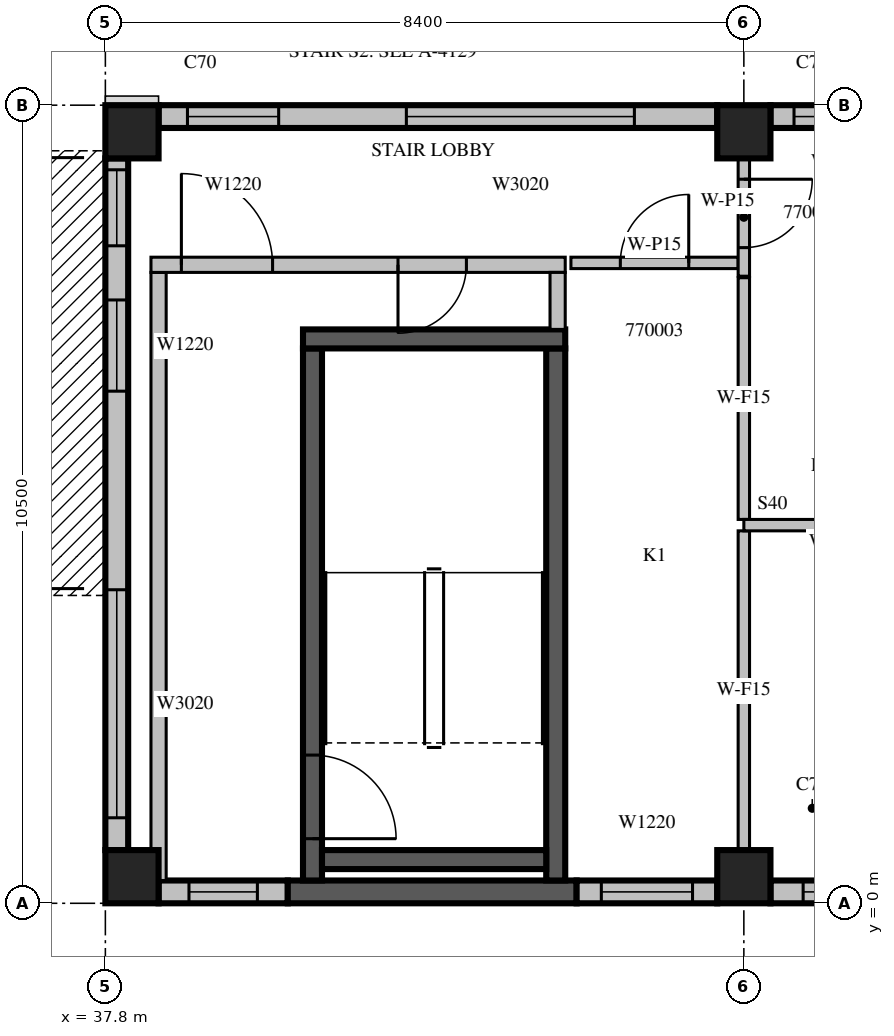
"""IFC4 building model, lengths in metres.
Left out: names, types, materials, properties, quantities, classifications, styles, units other than length and angle.
Written with IfcOpenShell. Run it as: python <this file> out.ifc"""

import sys

from ifc_helpers import new_model, si_unit, direction, frame, frame_2d, origin, origin_2d, place, context, subcontext, project, spatial, rectangle, extrude, source, transform, mapped, element, fill, save


model = new_model("IFC4")
c1 = context("Model", 3, precision=1e-05, world=origin(), true_north=direction((0.0, 1.0)))
c2 = subcontext(c1, "Body", "Model", "MODEL_VIEW")
j1 = project(units=[si_unit("LENGTHUNIT", "METRE"), si_unit("PLANEANGLEUNIT", "RADIAN")], contexts=[c1])
p1 = place(None, origin())
s1 = spatial("IfcSite", under=j1, at=p1, CompositionType="ELEMENT")
p2 = place(p1, origin())
s2 = spatial("IfcBuilding", under=s1, at=p2, CompositionType="ELEMENT")
p3 = place(p2, frame((0.0, 0.0, 305.5)))
s3 = spatial("IfcBuildingStorey", under=s2, at=p3, CompositionType="ELEMENT", Elevation=305.5)
m1 = source(origin(), c2, "Body", "SweptSolid", [
    extrude(rectangle(XDim=0.7, YDim=0.7, at=origin_2d()), origin(), (0.0, 0.0, 1.0), 3.5),
])
for number, where, z_axis, x_axis in (
    (1, (38.15, 0.35, 0.0), (0.0, 0.0, 1.0), (1.0, 0.0, 0.0)),
    (2, (46.2, 0.35, 0.0), (0.0, 0.0, 1.0), (1.0, 0.0, 0.0)),
    (3, (38.15, 10.15, 0.0), (0.0, 0.0, 1.0), (1.0, 0.0, 0.0)),
    (4, (46.2, 10.15, 0.0), (0.0, 0.0, 1.0), (1.0, 0.0, 0.0)),
):
    element("IfcColumn", number, at=place(p3, frame(where, z_axis=z_axis, x_axis=x_axis)), inside=s3, PredefinedType="COLUMN", context=c2, shape_type="MappedRepresentation", body=[
        mapped(m1, transform((0.0, 0.0, 0.0), scale=1.0)),
    ])
m2 = source(origin(), c2, "Body", "SweptSolid", [
    extrude(rectangle(XDim=1.7, YDim=0.3, at=frame_2d((0.85, 0.0))), origin(), (0.0, 0.0, 1.0), 3.1),
])
p4 = place(p3, frame((38.5, 0.15, 0.0), z_axis=(0.0, 0.0, 1.0), x_axis=(1.0, 0.0, 0.0)))
e5 = element("IfcWall", 5, at=p4, inside=s3, PredefinedType="STANDARD", context=c2, shape_type="MappedRepresentation", body=[
    mapped(m2, transform((0.0, 0.0, 0.0), scale=1.0)),
])
m3 = source(origin(), c2, "Body", "SweptSolid", [
    extrude(rectangle(XDim=0.9, YDim=2.0, at=frame_2d((0.45, 1.0))), frame((0.0, 0.16, 0.0), z_axis=(0.0, -1.0, 0.0), x_axis=(1.0, 0.0, 0.0)), (0.0, 0.0, 1.0), 0.32),
])
p5 = place(p4, frame((0.4, 0.0, 0.6)))
e6 = element("IfcOpeningElement", 6, at=p5, cuts=e5, PredefinedType="OPENING", context=c2, shape_type="MappedRepresentation", body=[
    mapped(m3, transform((0.0, 0.0, 0.0), scale=1.0)),
])
m4 = source(origin(), c2, "Body", "SweptSolid", [
    extrude(rectangle(XDim=3.8, YDim=0.3, at=frame_2d((1.9, 0.0))), origin(), (0.0, 0.0, 1.0), 3.1),
])
p6 = place(p3, frame((40.2, 0.15, 0.0), z_axis=(0.0, 0.0, 1.0), x_axis=(1.0, 0.0, 0.0)))
e7 = element("IfcWall", 7, at=p6, inside=s3, PredefinedType="SOLIDWALL", context=c2, shape_type="MappedRepresentation", body=[
    mapped(m4, transform((0.0, 0.0, 0.0), scale=1.0)),
])
m5 = source(origin(), c2, "Body", "SweptSolid", [
    extrude(rectangle(XDim=1.85, YDim=0.3, at=frame_2d((0.925, 0.0))), origin(), (0.0, 0.0, 1.0), 3.1),
])
p7 = place(p3, frame((44.0, 0.15, 0.0), z_axis=(0.0, 0.0, 1.0), x_axis=(1.0, 0.0, 0.0)))
e8 = element("IfcWall", 8, at=p7, inside=s3, PredefinedType="STANDARD", context=c2, shape_type="MappedRepresentation", body=[
    mapped(m5, transform((0.0, 0.0, 0.0), scale=1.0)),
])
m6 = source(origin(), c2, "Body", "SweptSolid", [
    extrude(rectangle(XDim=1.2, YDim=2.0, at=frame_2d((0.6, 1.0))), frame((0.0, 0.16, 0.0), z_axis=(0.0, -1.0, 0.0), x_axis=(1.0, 0.0, 0.0)), (0.0, 0.0, 1.0), 0.32),
])
p8 = place(p7, frame((0.325, 0.0, 0.6)))
e9 = element("IfcOpeningElement", 9, at=p8, cuts=e8, PredefinedType="OPENING", context=c2, shape_type="MappedRepresentation", body=[
    mapped(m6, transform((0.0, 0.0, 0.0), scale=1.0)),
])
m7 = source(origin(), c2, "Body", "SweptSolid", [
    extrude(rectangle(XDim=3.01, YDim=0.3, at=frame_2d((1.505, 0.0))), origin(), (0.0, 0.0, 1.0), 3.1),
])
p9 = place(p3, frame((46.55, 0.15, 0.0), z_axis=(0.0, 0.0, 1.0), x_axis=(1.0, 0.0, 0.0)))
e10 = element("IfcWall", 10, at=p9, inside=s3, PredefinedType="STANDARD", context=c2, shape_type="MappedRepresentation", body=[
    mapped(m7, transform((0.0, 0.0, 0.0), scale=1.0)),
])
m8 = source(origin(), c2, "Body", "SweptSolid", [
    extrude(rectangle(XDim=1.8, YDim=2.0, at=frame_2d((0.9, 1.0))), frame((0.0, 0.16, 0.0), z_axis=(0.0, -1.0, 0.0), x_axis=(1.0, 0.0, 0.0)), (0.0, 0.0, 1.0), 0.32),
])
p10 = place(p9, frame((0.43, 0.0, 0.6)))
e11 = element("IfcOpeningElement", 11, at=p10, cuts=e10, PredefinedType="OPENING", context=c2, shape_type="MappedRepresentation", body=[
    mapped(m8, transform((0.0, 0.0, 0.0), scale=1.0)),
])
p11 = place(p3, frame((49.56, 10.35, 0.0), z_axis=(0.0, 0.0, 1.0), x_axis=(-1.0, 0.0, 0.0)))
e12 = element("IfcWall", 12, at=p11, inside=s3, PredefinedType="STANDARD", context=c2, shape_type="MappedRepresentation", body=[
    mapped(m7, transform((0.0, 0.0, 0.0), scale=1.0)),
])
p12 = place(p11, frame((1.5, 0.0, 0.6)))
e13 = element("IfcOpeningElement", 13, at=p12, cuts=e12, PredefinedType="OPENING", context=c2, shape_type="MappedRepresentation", body=[
    mapped(m6, transform((0.0, 0.0, 0.0), scale=1.0)),
])
m9 = source(origin(), c2, "Body", "SweptSolid", [
    extrude(rectangle(XDim=7.35, YDim=0.3, at=frame_2d((3.675, 0.0))), origin(), (0.0, 0.0, 1.0), 3.1),
])
p13 = place(p3, frame((45.85, 10.35, 0.0), z_axis=(0.0, 0.0, 1.0), x_axis=(-1.0, 0.0, 0.0)))
e14 = element("IfcWall", 14, at=p13, inside=s3, PredefinedType="STANDARD", context=c2, shape_type="MappedRepresentation", body=[
    mapped(m9, transform((0.0, 0.0, 0.0), scale=1.0)),
])
m10 = source(origin(), c2, "Body", "SweptSolid", [
    extrude(rectangle(XDim=3.0, YDim=2.0, at=frame_2d((1.5, 1.0))), frame((0.0, 0.16, 0.0), z_axis=(0.0, -1.0, 0.0), x_axis=(1.0, 0.0, 0.0)), (0.0, 0.0, 1.0), 0.32),
])
p14 = place(p13, frame((1.09, 0.0, 0.6)))
e15 = element("IfcOpeningElement", 15, at=p14, cuts=e14, PredefinedType="OPENING", context=c2, shape_type="MappedRepresentation", body=[
    mapped(m10, transform((0.0, 0.0, 0.0), scale=1.0)),
])
p15 = place(p13, frame((5.77, 0.0, 0.6)))
e16 = element("IfcOpeningElement", 16, at=p15, cuts=e14, PredefinedType="OPENING", context=c2, shape_type="MappedRepresentation", body=[
    mapped(m6, transform((0.0, 0.0, 0.0), scale=1.0)),
])
m11 = source(origin(), c2, "Body", "SweptSolid", [
    extrude(rectangle(XDim=9.1, YDim=0.3, at=frame_2d((4.55, 0.0))), origin(), (0.0, 0.0, 1.0), 3.1),
])
p16 = place(p3, frame((37.95, 9.8, 0.0), z_axis=(0.0, 0.0, 1.0), x_axis=(0.0, -1.0, 0.0)))
e17 = element("IfcWall", 17, at=p16, inside=s3, PredefinedType="STANDARD", context=c2, shape_type="MappedRepresentation", body=[
    mapped(m11, transform((0.0, 0.0, 0.0), scale=1.0)),
])
p17 = place(p16, frame((1.863, 0.0, 0.6)))
e18 = element("IfcOpeningElement", 18, at=p17, cuts=e17, PredefinedType="OPENING", context=c2, shape_type="MappedRepresentation", body=[
    mapped(m6, transform((0.0, 0.0, 0.0), scale=1.0)),
])
p18 = place(p16, frame((5.675, 0.0, 0.6)))
e19 = element("IfcOpeningElement", 19, at=p18, cuts=e17, PredefinedType="OPENING", context=c2, shape_type="MappedRepresentation", body=[
    mapped(m10, transform((0.0, 0.0, 0.0), scale=1.0)),
])
m12 = source(origin(), c2, "Body", "SweptSolid", [
    extrude(rectangle(XDim=1.0, YDim=2.1, at=frame_2d((0.5, 1.05))), frame((0.0, 0.16, 0.0), z_axis=(0.0, -1.0, 0.0), x_axis=(1.0, 0.0, 0.0)), (0.0, 0.0, 1.0), 0.32),
])
p19 = place(p16, frame((0.15, 0.0, 0.0)))
e20 = element("IfcOpeningElement", 20, at=p19, cuts=e17, PredefinedType="OPENING", context=c2, shape_type="MappedRepresentation", body=[
    mapped(m12, transform((0.0, 0.0, 0.0), scale=1.0)),
])
m13 = source(origin(), c2, "Body", "SweptSolid", [
    extrude(rectangle(XDim=7.0, YDim=0.25, at=frame_2d((3.5, 0.0))), origin(), (0.0, 0.0, 1.0), 3.1),
])
p20 = place(p3, frame((40.525, 0.3, 0.0), z_axis=(0.0, 0.0, 1.0), x_axis=(0.0, 1.0, 0.0)))
e21 = element("IfcWall", 21, at=p20, inside=s3, PredefinedType="SOLIDWALL", context=c2, shape_type="MappedRepresentation", body=[
    mapped(m13, transform((0.0, 0.0, 0.0), scale=1.0)),
])
m14 = source(origin(), c2, "Body", "SweptSolid", [
    extrude(rectangle(XDim=1.1, YDim=2.1, at=frame_2d((0.55, 1.05))), frame((0.0, 0.135, 0.0), z_axis=(0.0, -1.0, 0.0), x_axis=(1.0, 0.0, 0.0)), (0.0, 0.0, 1.0), 0.27),
])
p21 = place(p20, frame((0.55, 0.0, 0.0)))
e22 = element("IfcOpeningElement", 22, at=p21, cuts=e21, PredefinedType="OPENING", context=c2, shape_type="MappedRepresentation", body=[
    mapped(m14, transform((0.0, 0.0, 0.0), scale=1.0)),
])
p22 = place(p3, frame((43.725, 0.3, 0.0), z_axis=(0.0, 0.0, 1.0), x_axis=(0.0, 1.0, 0.0)))
e23 = element("IfcWall", 23, at=p22, inside=s3, PredefinedType="SOLIDWALL", context=c2, shape_type="MappedRepresentation", body=[
    mapped(m13, transform((0.0, 0.0, 0.0), scale=1.0)),
])
m15 = source(origin(), c2, "Body", "SweptSolid", [
    extrude(rectangle(XDim=3.45, YDim=0.25, at=frame_2d((1.725, 0.0))), origin(), (0.0, 0.0, 1.0), 3.1),
])
p23 = place(p3, frame((40.4, 7.425, 0.0), z_axis=(0.0, 0.0, 1.0), x_axis=(1.0, 0.0, 0.0)))
e24 = element("IfcWall", 24, at=p23, inside=s3, PredefinedType="SOLIDWALL", context=c2, shape_type="MappedRepresentation", body=[
    mapped(m15, transform((0.0, 0.0, 0.0), scale=1.0)),
])
m16 = source(origin(), c2, "Body", "SweptSolid", [
    extrude(rectangle(XDim=2.95, YDim=0.25, at=frame_2d((1.475, 0.0))), origin(), (0.0, 0.0, 1.0), 3.1),
])
p24 = place(p3, frame((40.65, 0.575, 0.0), z_axis=(0.0, 0.0, 1.0), x_axis=(1.0, 0.0, 0.0)))
e25 = element("IfcWall", 25, at=p24, inside=s3, PredefinedType="SOLIDWALL", context=c2, shape_type="MappedRepresentation", body=[
    mapped(m16, transform((0.0, 0.0, 0.0), scale=1.0)),
])
m17 = source(origin(), c2, "Body", "SweptSolid", [
    extrude(rectangle(XDim=8.0, YDim=0.2, at=frame_2d((4.0, 0.0))), origin(), (0.0, 0.0, 1.0), 3.1),
])
p25 = place(p3, frame((38.5, 0.3, 0.0), z_axis=(0.0, 0.0, 1.0), x_axis=(0.0, 1.0, 0.0)))
e26 = element("IfcWall", 26, at=p25, inside=s3, PredefinedType="PARTITIONING", context=c2, shape_type="MappedRepresentation", body=[
    mapped(m17, transform((0.0, 0.0, 0.0), scale=1.0)),
])
m18 = source(origin(), c2, "Body", "SweptSolid", [
    extrude(rectangle(XDim=5.45, YDim=0.2, at=frame_2d((2.725, 0.0))), origin(), (0.0, 0.0, 1.0), 3.1),
])
p26 = place(p3, frame((38.4, 8.4, 0.0), z_axis=(0.0, 0.0, 1.0), x_axis=(1.0, 0.0, 0.0)))
e27 = element("IfcWall", 27, at=p26, inside=s3, PredefinedType="PARTITIONING", context=c2, shape_type="MappedRepresentation", body=[
    mapped(m18, transform((0.0, 0.0, 0.0), scale=1.0)),
])
m19 = source(origin(), c2, "Body", "SweptSolid", [
    extrude(rectangle(XDim=1.2, YDim=2.1, at=frame_2d((0.6, 1.05))), frame((0.0, 0.11, 0.0), z_axis=(0.0, -1.0, 0.0), x_axis=(1.0, 0.0, 0.0)), (0.0, 0.0, 1.0), 0.22),
])
p27 = place(p26, frame((0.4, 0.0, 0.0)))
e28 = element("IfcOpeningElement", 28, at=p27, cuts=e27, PredefinedType="OPENING", context=c2, shape_type="MappedRepresentation", body=[
    mapped(m19, transform((0.0, 0.0, 0.0), scale=1.0)),
])
m20 = source(origin(), c2, "Body", "SweptSolid", [
    extrude(rectangle(XDim=0.9, YDim=2.1, at=frame_2d((0.45, 1.05))), frame((0.0, 0.11, 0.0), z_axis=(0.0, -1.0, 0.0), x_axis=(1.0, 0.0, 0.0)), (0.0, 0.0, 1.0), 0.22),
])
p28 = place(p26, frame((3.25, 0.0, 0.0)))
e29 = element("IfcOpeningElement", 29, at=p28, cuts=e27, PredefinedType="OPENING", context=c2, shape_type="MappedRepresentation", body=[
    mapped(m20, transform((0.0, 0.0, 0.0), scale=1.0)),
])
m21 = source(origin(), c2, "Body", "SweptSolid", [
    extrude(rectangle(XDim=0.75, YDim=0.2, at=frame_2d((0.375, 0.0))), origin(), (0.0, 0.0, 1.0), 3.1),
])
p29 = place(p3, frame((43.75, 7.55, 0.0), z_axis=(0.0, 0.0, 1.0), x_axis=(0.0, 1.0, 0.0)))
e30 = element("IfcWall", 30, at=p29, inside=s3, PredefinedType="PARTITIONING", context=c2, shape_type="MappedRepresentation", body=[
    mapped(m21, transform((0.0, 0.0, 0.0), scale=1.0)),
])
m22 = source(origin(), c2, "Body", "SweptSolid", [
    extrude(rectangle(XDim=2.2, YDim=0.15, at=frame_2d((1.1, 0.0))), origin(), (0.0, 0.0, 1.0), 3.1),
])
p30 = place(p3, frame((46.125, 8.425, 0.0), z_axis=(0.0, 0.0, 1.0), x_axis=(-1.0, 0.0, 0.0)))
e31 = element("IfcWall", 31, at=p30, inside=s3, PredefinedType="PARTITIONING", context=c2, shape_type="MappedRepresentation", body=[
    mapped(m22, transform((0.0, 0.0, 0.0), scale=1.0)),
])
m23 = source(origin(), c2, "Body", "SweptSolid", [
    extrude(rectangle(XDim=0.9, YDim=2.1, at=frame_2d((0.45, 1.05))), frame((0.0, 0.085, 0.0), z_axis=(0.0, -1.0, 0.0), x_axis=(1.0, 0.0, 0.0)), (0.0, 0.0, 1.0), 0.17),
])
p31 = place(p30, frame((0.65, 0.0, 0.0)))
e32 = element("IfcOpeningElement", 32, at=p31, cuts=e31, PredefinedType="OPENING", context=c2, shape_type="MappedRepresentation", body=[
    mapped(m23, transform((0.0, 0.0, 0.0), scale=1.0)),
])
m24 = source(origin(), c2, "Body", "SweptSolid", [
    extrude(rectangle(XDim=1.551, YDim=0.15, at=frame_2d((0.775, 0.0))), origin(), (0.0, 0.0, 1.0), 3.1),
])
p32 = place(p3, frame((46.2, 9.801, 0.0), z_axis=(0.0, 0.0, 1.0), x_axis=(0.0, -1.0, 0.0)))
e33 = element("IfcWall", 33, at=p32, inside=s3, PredefinedType="PARTITIONING", context=c2, shape_type="MappedRepresentation", body=[
    mapped(m24, transform((0.0, 0.0, 0.0), scale=1.0)),
])
p33 = place(p32, frame((0.275, 0.0, 0.0)))
e34 = element("IfcOpeningElement", 34, at=p33, cuts=e33, PredefinedType="OPENING", context=c2, shape_type="MappedRepresentation", body=[
    mapped(m23, transform((0.0, 0.0, 0.0), scale=1.0)),
])
m25 = source(origin(), c2, "Body", "SweptSolid", [
    extrude(rectangle(XDim=4.201, YDim=0.15, at=frame_2d((2.1, 0.0))), origin(), (0.0, 0.0, 1.0), 3.1),
])
p34 = place(p3, frame((46.2, 0.699, 0.0), z_axis=(0.0, 0.0, 1.0), x_axis=(0.0, 1.0, 0.0)))
e35 = element("IfcWall", 35, at=p34, inside=s3, PredefinedType="PARTITIONING", context=c2, shape_type="MappedRepresentation", body=[
    mapped(m25, transform((0.0, 0.0, 0.0), scale=1.0)),
])
p35 = place(p3, frame((46.2, 5.05, 0.0), z_axis=(0.0, 0.0, 1.0), x_axis=(0.0, 1.0, 0.0)))
e36 = element("IfcWall", 36, at=p35, inside=s3, PredefinedType="PARTITIONING", context=c2, shape_type="SweptSolid", body=[
    extrude(rectangle(XDim=3.18, YDim=0.15, at=frame_2d((1.59, 0.0))), origin(), (0.0, 0.0, 1.0), 3.1),
])
m26 = source(origin(), c2, "Body", "SweptSolid", [
    extrude(rectangle(XDim=3.06, YDim=0.15, at=frame_2d((1.53, 0.0))), origin(), (0.0, 0.0, 1.0), 3.1),
])
p36 = place(p3, frame((49.26, 4.975, 0.0), z_axis=(0.0, 0.0, 1.0), x_axis=(-1.0, 0.0, 0.0)))
e37 = element("IfcWall", 37, at=p36, inside=s3, PredefinedType="PARTITIONING", context=c2, shape_type="MappedRepresentation", body=[
    mapped(m26, transform((0.0, 0.0, 0.0), scale=1.0)),
])
m27 = source(origin(), c2, "Body", "SweptSolid", [
    extrude(rectangle(XDim=0.9, YDim=2.0, at=frame_2d((0.45, 1.0))), frame((0.0, 0.03, 0.0), z_axis=(0.0, -1.0, 0.0), x_axis=(1.0, 0.0, 0.0)), (0.0, 0.0, 1.0), 0.06),
])
p37 = place(p5, origin())
e38 = element("IfcWindow", 38, at=p37, inside=s3, PartitioningType="SINGLE_PANEL", PredefinedType="WINDOW", context=c2, shape_type="MappedRepresentation", body=[
    mapped(m27, transform((0.0, 0.0, 0.0), scale=1.0)),
])
fill(e6, e38)
m28 = source(origin(), c2, "Body", "SweptSolid", [
    extrude(rectangle(XDim=1.2, YDim=2.0, at=frame_2d((0.6, 1.0))), frame((0.0, 0.03, 0.0), z_axis=(0.0, -1.0, 0.0), x_axis=(1.0, 0.0, 0.0)), (0.0, 0.0, 1.0), 0.06),
])
p38 = place(p8, origin())
e39 = element("IfcWindow", 39, at=p38, inside=s3, PartitioningType="SINGLE_PANEL", PredefinedType="WINDOW", context=c2, shape_type="MappedRepresentation", body=[
    mapped(m28, transform((0.0, 0.0, 0.0), scale=1.0)),
])
fill(e9, e39)
m29 = source(origin(), c2, "Body", "SweptSolid", [
    extrude(rectangle(XDim=1.8, YDim=2.0, at=frame_2d((0.9, 1.0))), frame((0.0, 0.03, 0.0), z_axis=(0.0, -1.0, 0.0), x_axis=(1.0, 0.0, 0.0)), (0.0, 0.0, 1.0), 0.06),
])
p39 = place(p10, origin())
e40 = element("IfcWindow", 40, at=p39, inside=s3, PartitioningType="SINGLE_PANEL", PredefinedType="WINDOW", context=c2, shape_type="MappedRepresentation", body=[
    mapped(m29, transform((0.0, 0.0, 0.0), scale=1.0)),
])
fill(e11, e40)
p40 = place(p12, origin())
e41 = element("IfcWindow", 41, at=p40, inside=s3, PartitioningType="SINGLE_PANEL", PredefinedType="WINDOW", context=c2, shape_type="MappedRepresentation", body=[
    mapped(m28, transform((0.0, 0.0, 0.0), scale=1.0)),
])
fill(e13, e41)
m30 = source(origin(), c2, "Body", "SweptSolid", [
    extrude(rectangle(XDim=3.0, YDim=2.0, at=frame_2d((1.5, 1.0))), frame((0.0, 0.03, 0.0), z_axis=(0.0, -1.0, 0.0), x_axis=(1.0, 0.0, 0.0)), (0.0, 0.0, 1.0), 0.06),
])
p41 = place(p14, origin())
e42 = element("IfcWindow", 42, at=p41, inside=s3, PartitioningType="SINGLE_PANEL", PredefinedType="WINDOW", context=c2, shape_type="MappedRepresentation", body=[
    mapped(m30, transform((0.0, 0.0, 0.0), scale=1.0)),
])
fill(e15, e42)
p42 = place(p15, origin())
e43 = element("IfcWindow", 43, at=p42, inside=s3, PartitioningType="SINGLE_PANEL", PredefinedType="WINDOW", context=c2, shape_type="MappedRepresentation", body=[
    mapped(m28, transform((0.0, 0.0, 0.0), scale=1.0)),
])
fill(e16, e43)
p43 = place(p17, origin())
e44 = element("IfcWindow", 44, at=p43, inside=s3, PartitioningType="SINGLE_PANEL", PredefinedType="WINDOW", context=c2, shape_type="MappedRepresentation", body=[
    mapped(m28, transform((0.0, 0.0, 0.0), scale=1.0)),
])
fill(e18, e44)
p44 = place(p18, origin())
e45 = element("IfcWindow", 45, at=p44, inside=s3, PartitioningType="SINGLE_PANEL", PredefinedType="WINDOW", context=c2, shape_type="MappedRepresentation", body=[
    mapped(m30, transform((0.0, 0.0, 0.0), scale=1.0)),
])
fill(e19, e45)
m31 = source(origin(), c2, "Body", "SweptSolid", [
    extrude(rectangle(XDim=1.0, YDim=2.1, at=frame_2d((0.5, 1.05))), frame((0.0, 0.025, 0.0), z_axis=(0.0, -1.0, 0.0), x_axis=(1.0, 0.0, 0.0)), (0.0, 0.0, 1.0), 0.05),
])
p45 = place(p19, origin())
e46 = element("IfcDoor", 46, at=p45, inside=s3, OperationType="SLIDING_TO_LEFT", PredefinedType="DOOR", context=c2, shape_type="MappedRepresentation", body=[
    mapped(m31, transform((0.0, 0.0, 0.0), scale=1.0)),
])
fill(e20, e46)
m32 = source(origin(), c2, "Body", "SweptSolid", [
    extrude(rectangle(XDim=1.1, YDim=2.1, at=frame_2d((0.55, 1.05))), frame((0.0, 0.025, 0.0), z_axis=(0.0, -1.0, 0.0), x_axis=(1.0, 0.0, 0.0)), (0.0, 0.0, 1.0), 0.05),
])
p46 = place(p21, origin())
e47 = element("IfcDoor", 47, at=p46, inside=s3, OperationType="SINGLE_SWING_RIGHT", PredefinedType="DOOR", context=c2, shape_type="MappedRepresentation", body=[
    mapped(m32, transform((0.0, 0.0, 0.0), scale=1.0)),
])
fill(e22, e47)
m33 = source(origin(), c2, "Body", "SweptSolid", [
    extrude(rectangle(XDim=1.2, YDim=2.1, at=frame_2d((0.6, 1.05))), frame((0.0, 0.025, 0.0), z_axis=(0.0, -1.0, 0.0), x_axis=(1.0, 0.0, 0.0)), (0.0, 0.0, 1.0), 0.05),
])
p47 = place(p27, origin())
e48 = element("IfcDoor", 48, at=p47, inside=s3, OperationType="SINGLE_SWING_LEFT", PredefinedType="DOOR", context=c2, shape_type="MappedRepresentation", body=[
    mapped(m33, transform((0.0, 0.0, 0.0), scale=1.0)),
])
fill(e28, e48)
m34 = source(origin(), c2, "Body", "SweptSolid", [
    extrude(rectangle(XDim=0.9, YDim=2.1, at=frame_2d((0.45, 1.05))), frame((0.0, 0.025, 0.0), z_axis=(0.0, -1.0, 0.0), x_axis=(1.0, 0.0, 0.0)), (0.0, 0.0, 1.0), 0.05),
])
p48 = place(p28, origin())
e49 = element("IfcDoor", 49, at=p48, inside=s3, OperationType="SINGLE_SWING_RIGHT", PredefinedType="DOOR", context=c2, shape_type="MappedRepresentation", body=[
    mapped(m34, transform((0.0, 0.0, 0.0), scale=1.0)),
])
fill(e29, e49)
p49 = place(p31, origin())
e50 = element("IfcDoor", 50, at=p49, inside=s3, OperationType="SINGLE_SWING_RIGHT", PredefinedType="DOOR", context=c2, shape_type="MappedRepresentation", body=[
    mapped(m34, transform((0.0, 0.0, 0.0), scale=1.0)),
])
fill(e32, e50)
p50 = place(p33, origin())
e51 = element("IfcDoor", 51, at=p50, inside=s3, OperationType="SINGLE_SWING_LEFT", PredefinedType="DOOR", context=c2, shape_type="MappedRepresentation", body=[
    mapped(m34, transform((0.0, 0.0, 0.0), scale=1.0)),
])
fill(e34, e51)
save(model, sys.argv[1])
